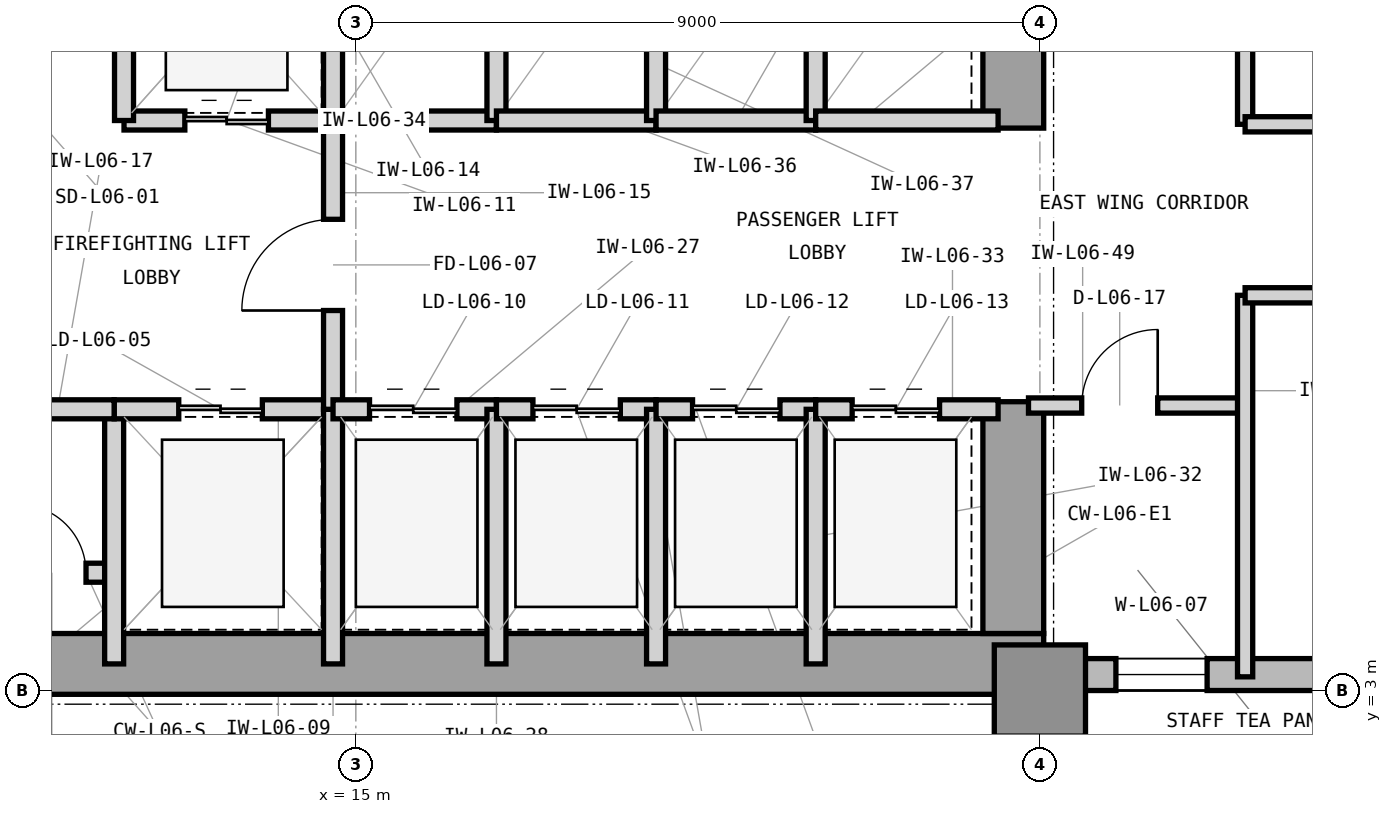
"""IFC4 building model, lengths in metres.
Left out: names, types, materials, properties, quantities, classifications, styles, units other than length and angle.
Written with IfcOpenShell. Run it as: python <this file> out.ifc"""

import sys

from ifc_helpers import new_model, si_unit, direction, frame, frame_2d, origin, origin_2d, place, context, subcontext, project, spatial, rectangle, extrude, element, fill, save


model = new_model("IFC4")
c1 = context("Model", 3, precision=1e-05, world=origin(), true_north=direction((0.0, 1.0)))
c2 = subcontext(c1, "Body", "Model", "MODEL_VIEW")
j1 = project(units=[si_unit("LENGTHUNIT", "METRE"), si_unit("PLANEANGLEUNIT", "RADIAN")], contexts=[c1])
p1 = place(None, origin())
s1 = spatial("IfcSite", under=j1, at=p1, CompositionType="ELEMENT")
p2 = place(p1, origin())
s2 = spatial("IfcBuilding", under=s1, at=p2, CompositionType="ELEMENT")
p3 = place(p2, frame((0.0, 0.0, 30.0)))
s3 = spatial("IfcBuildingStorey", under=s2, at=p3, CompositionType="ELEMENT", Elevation=30.0)
p4 = place(p3, frame((7.475, 3.35, 0.0), z_axis=(0.0, 0.0, 1.0), x_axis=(1.0, 0.0, 0.0)))
e1 = element("IfcWall", 1, at=p4, inside=s3, PredefinedType="SHEAR", context=c2, shape_type="SweptSolid", body=[
    extrude(rectangle(XDim=16.575, YDim=0.8, at=frame_2d((8.288, 0.0))), origin(), (0.0, 0.0, 1.0), 4.2),
])
p5 = place(p3, frame((23.65, 3.75, 0.0), z_axis=(0.0, 0.0, 1.0), x_axis=(0.0, 1.0, 0.0)))
e2 = element("IfcWall", 2, at=p5, inside=s3, PredefinedType="SHEAR", context=c2, shape_type="SweptSolid", body=[
    extrude(rectangle(XDim=3.05, YDim=0.8, at=frame_2d((1.525, 0.0))), origin(), (0.0, 0.0, 1.0), 4.2),
])
p6 = place(p3, frame((23.65, 10.4, 0.0), z_axis=(0.0, 0.0, 1.0), x_axis=(0.0, 1.0, 0.0)))
e3 = element("IfcWall", 3, at=p6, inside=s3, PredefinedType="SHEAR", context=c2, shape_type="SweptSolid", body=[
    extrude(rectangle(XDim=3.2, YDim=0.8, at=frame_2d((1.6, 0.0))), origin(), (0.0, 0.0, 1.0), 4.2),
])
p7 = place(p3, frame((24.0, 3.0, 0.0), z_axis=(0.0, 0.0, 1.0), x_axis=(1.0, 0.0, 0.0)))
e4 = element("IfcColumn", 4, at=p7, inside=s3, PredefinedType="COLUMN", context=c2, shape_type="SweptSolid", body=[
    extrude(rectangle(XDim=1.2, YDim=1.2, at=origin_2d()), origin(), (0.0, 0.0, 1.0), 4.2),
])
p8 = place(p3, frame((23.9, 3.21, 0.0), z_axis=(0.0, 0.0, 1.0), x_axis=(1.0, 0.0, 0.0)))
e5 = element("IfcWall", 5, at=p8, inside=s3, PredefinedType="STANDARD", context=c2, shape_type="SweptSolid", body=[
    extrude(rectangle(XDim=40.5, YDim=0.42, at=frame_2d((20.25, 0.0))), origin(), (0.0, 0.0, 1.0), 3.98),
])
p9 = place(p8, frame((1.1, 0.0, 0.85)))
e6 = element("IfcOpeningElement", 6, at=p9, cuts=e5, PredefinedType="OPENING", context=c2, shape_type="SweptSolid", body=[
    extrude(rectangle(XDim=1.2, YDim=2.45, at=frame_2d((0.6, 1.225))), frame((0.0, 0.22, 0.0), z_axis=(0.0, -1.0, 0.0), x_axis=(1.0, 0.0, 0.0)), (0.0, 0.0, 1.0), 0.44),
])
p10 = place(p8, frame((5.336, 0.0, 0.85)))
e7 = element("IfcOpeningElement", 7, at=p10, cuts=e5, PredefinedType="OPENING", context=c2, shape_type="SweptSolid", body=[
    extrude(rectangle(XDim=2.8, YDim=2.45, at=frame_2d((1.4, 1.225))), frame((0.0, 0.22, 0.0), z_axis=(0.0, -1.0, 0.0), x_axis=(1.0, 0.0, 0.0)), (0.0, 0.0, 1.0), 0.44),
])
p11 = place(p8, frame((14.336, 0.0, 0.85)))
e8 = element("IfcOpeningElement", 8, at=p11, cuts=e5, PredefinedType="OPENING", context=c2, shape_type="SweptSolid", body=[
    extrude(rectangle(XDim=2.8, YDim=2.45, at=frame_2d((1.4, 1.225))), frame((0.0, 0.22, 0.0), z_axis=(0.0, -1.0, 0.0), x_axis=(1.0, 0.0, 0.0)), (0.0, 0.0, 1.0), 0.44),
])
p12 = place(p8, frame((21.086, 0.0, 0.85)))
e9 = element("IfcOpeningElement", 9, at=p12, cuts=e5, PredefinedType="OPENING", context=c2, shape_type="SweptSolid", body=[
    extrude(rectangle(XDim=2.1, YDim=2.45, at=frame_2d((1.05, 1.225))), frame((0.0, 0.22, 0.0), z_axis=(0.0, -1.0, 0.0), x_axis=(1.0, 0.0, 0.0)), (0.0, 0.0, 1.0), 0.44),
])
p13 = place(p3, frame((10.33, 4.55, 0.0), z_axis=(0.0, 0.0, 1.0), x_axis=(1.0, 0.0, 0.0)))
e10 = element("IfcWall", 10, at=p13, inside=s3, PredefinedType="PARTITIONING", context=c2, shape_type="SweptSolid", body=[
    extrude(rectangle(XDim=1.49, YDim=0.25, at=frame_2d((0.745, 0.0))), origin(), (0.0, 0.0, 1.0), 3.97),
])
p14 = place(p13, frame((0.22, 0.0, 0.0)))
e11 = element("IfcOpeningElement", 11, at=p14, cuts=e10, PredefinedType="OPENING", context=c2, shape_type="SweptSolid", body=[
    extrude(rectangle(XDim=0.9, YDim=2.1, at=frame_2d((0.45, 1.05))), frame((0.0, 0.135, 0.0), z_axis=(0.0, -1.0, 0.0), x_axis=(1.0, 0.0, 0.0)), (0.0, 0.0, 1.0), 0.27),
])
p15 = place(p3, frame((11.82, 3.35, 0.0), z_axis=(0.0, 0.0, 1.0), x_axis=(0.0, 1.0, 0.0)))
e12 = element("IfcWall", 12, at=p15, inside=s3, PredefinedType="PARTITIONING", context=c2, shape_type="SweptSolid", body=[
    extrude(rectangle(XDim=3.35, YDim=0.25, at=frame_2d((1.675, 0.0))), origin(), (0.0, 0.0, 1.0), 3.97),
])
p16 = place(p3, frame((11.82, 6.7, 0.0), z_axis=(0.0, 0.0, 1.0), x_axis=(1.0, 0.0, 0.0)))
e13 = element("IfcWall", 13, at=p16, inside=s3, PredefinedType="PARTITIONING", context=c2, shape_type="SweptSolid", body=[
    extrude(rectangle(XDim=2.88, YDim=0.25, at=frame_2d((1.44, 0.0))), origin(), (0.0, 0.0, 1.0), 3.426),
])
p17 = place(p16, frame((0.85, 0.0, 0.0)))
e14 = element("IfcOpeningElement", 14, at=p17, cuts=e13, PredefinedType="OPENING", context=c2, shape_type="SweptSolid", body=[
    extrude(rectangle(XDim=1.1, YDim=2.25, at=frame_2d((0.55, 1.125))), frame((0.0, 0.135, 0.0), z_axis=(0.0, -1.0, 0.0), x_axis=(1.0, 0.0, 0.0)), (0.0, 0.0, 1.0), 0.27),
])
p18 = place(p3, frame((14.7, 3.35, 0.0), z_axis=(0.0, 0.0, 1.0), x_axis=(0.0, 1.0, 0.0)))
e15 = element("IfcWall", 15, at=p18, inside=s3, PredefinedType="PARTITIONING", context=c2, shape_type="SweptSolid", body=[
    extrude(rectangle(XDim=3.35, YDim=0.25, at=frame_2d((1.675, 0.0))), origin(), (0.0, 0.0, 1.0), 3.97),
])
p19 = place(p3, frame((11.95, 10.5, 0.0), z_axis=(0.0, 0.0, 1.0), x_axis=(1.0, 0.0, 0.0)))
e16 = element("IfcWall", 16, at=p19, inside=s3, PredefinedType="PARTITIONING", context=c2, shape_type="SweptSolid", body=[
    extrude(rectangle(XDim=2.75, YDim=0.25, at=frame_2d((1.375, 0.0))), origin(), (0.0, 0.0, 1.0), 3.426),
])
p20 = place(p19, frame((0.8, 0.0, 0.0)))
e17 = element("IfcOpeningElement", 17, at=p20, cuts=e16, PredefinedType="OPENING", context=c2, shape_type="SweptSolid", body=[
    extrude(rectangle(XDim=1.1, YDim=2.25, at=frame_2d((0.55, 1.125))), frame((0.0, 0.135, 0.0), z_axis=(0.0, -1.0, 0.0), x_axis=(1.0, 0.0, 0.0)), (0.0, 0.0, 1.0), 0.27),
])
for number, where, z_axis, x_axis in (
    (18, (11.95, 10.5, 0.0), (0.0, 0.0, 1.0), (0.0, 1.0, 0.0)),
    (19, (14.7, 10.5, 0.0), (0.0, 0.0, 1.0), (0.0, 1.0, 0.0)),
):
    element("IfcWall", number, at=place(p3, frame(where, z_axis=z_axis, x_axis=x_axis)), inside=s3, PredefinedType="PARTITIONING", context=c2, shape_type="SweptSolid", body=[
        extrude(rectangle(XDim=3.0, YDim=0.25, at=frame_2d((1.5, 0.0))), origin(), (0.0, 0.0, 1.0), 3.97),
    ])
p21 = place(p3, frame((14.7, 6.7, 0.0), z_axis=(0.0, 0.0, 1.0), x_axis=(0.0, 1.0, 0.0)))
e20 = element("IfcWall", 20, at=p21, inside=s3, PredefinedType="PARTITIONING", context=c2, shape_type="SweptSolid", body=[
    extrude(rectangle(XDim=3.8, YDim=0.25, at=frame_2d((1.9, 0.0))), origin(), (0.0, 0.0, 1.0), 3.97),
])
p22 = place(p21, frame((1.3, 0.0, 0.0)))
e21 = element("IfcOpeningElement", 21, at=p22, cuts=e20, PredefinedType="OPENING", context=c2, shape_type="SweptSolid", body=[
    extrude(rectangle(XDim=1.2, YDim=2.2, at=frame_2d((0.6, 1.1))), frame((0.0, 0.135, 0.0), z_axis=(0.0, -1.0, 0.0), x_axis=(1.0, 0.0, 0.0)), (0.0, 0.0, 1.0), 0.27),
])
p23 = place(p3, frame((10.33, 6.7, 0.0), z_axis=(0.0, 0.0, 1.0), x_axis=(1.0, 0.0, 0.0)))
e22 = element("IfcWall", 22, at=p23, inside=s3, PredefinedType="PARTITIONING", context=c2, shape_type="SweptSolid", body=[
    extrude(rectangle(XDim=1.49, YDim=0.25, at=frame_2d((0.745, 0.0))), origin(), (0.0, 0.0, 1.0), 3.426),
])
p24 = place(p3, frame((14.7, 6.7, 0.0), z_axis=(0.0, 0.0, 1.0), x_axis=(1.0, 0.0, 0.0)))
e23 = element("IfcWall", 23, at=p24, inside=s3, PredefinedType="PARTITIONING", context=c2, shape_type="SweptSolid", body=[
    extrude(rectangle(XDim=2.15, YDim=0.25, at=frame_2d((1.075, 0.0))), origin(), (0.0, 0.0, 1.0), 3.426),
])
p25 = place(p24, frame((0.48, 0.0, 0.0)))
e24 = element("IfcOpeningElement", 24, at=p25, cuts=e23, PredefinedType="OPENING", context=c2, shape_type="SweptSolid", body=[
    extrude(rectangle(XDim=1.15, YDim=2.25, at=frame_2d((0.575, 1.125))), frame((0.0, 0.135, 0.0), z_axis=(0.0, -1.0, 0.0), x_axis=(1.0, 0.0, 0.0)), (0.0, 0.0, 1.0), 0.27),
])
p26 = place(p3, frame((16.85, 3.35, 0.0), z_axis=(0.0, 0.0, 1.0), x_axis=(0.0, 1.0, 0.0)))
e25 = element("IfcWall", 25, at=p26, inside=s3, PredefinedType="PARTITIONING", context=c2, shape_type="SweptSolid", body=[
    extrude(rectangle(XDim=3.35, YDim=0.25, at=frame_2d((1.675, 0.0))), origin(), (0.0, 0.0, 1.0), 3.97),
])
p27 = place(p3, frame((16.85, 6.7, 0.0), z_axis=(0.0, 0.0, 1.0), x_axis=(1.0, 0.0, 0.0)))
e26 = element("IfcWall", 26, at=p27, inside=s3, PredefinedType="PARTITIONING", context=c2, shape_type="SweptSolid", body=[
    extrude(rectangle(XDim=2.1, YDim=0.25, at=frame_2d((1.05, 0.0))), origin(), (0.0, 0.0, 1.0), 3.426),
])
p28 = place(p27, frame((0.48, 0.0, 0.0)))
e27 = element("IfcOpeningElement", 27, at=p28, cuts=e26, PredefinedType="OPENING", context=c2, shape_type="SweptSolid", body=[
    extrude(rectangle(XDim=1.15, YDim=2.25, at=frame_2d((0.575, 1.125))), frame((0.0, 0.135, 0.0), z_axis=(0.0, -1.0, 0.0), x_axis=(1.0, 0.0, 0.0)), (0.0, 0.0, 1.0), 0.27),
])
p29 = place(p3, frame((18.95, 3.35, 0.0), z_axis=(0.0, 0.0, 1.0), x_axis=(0.0, 1.0, 0.0)))
e28 = element("IfcWall", 28, at=p29, inside=s3, PredefinedType="PARTITIONING", context=c2, shape_type="SweptSolid", body=[
    extrude(rectangle(XDim=3.35, YDim=0.25, at=frame_2d((1.675, 0.0))), origin(), (0.0, 0.0, 1.0), 3.97),
])
p30 = place(p3, frame((18.95, 6.7, 0.0), z_axis=(0.0, 0.0, 1.0), x_axis=(1.0, 0.0, 0.0)))
e29 = element("IfcWall", 29, at=p30, inside=s3, PredefinedType="PARTITIONING", context=c2, shape_type="SweptSolid", body=[
    extrude(rectangle(XDim=2.1, YDim=0.25, at=frame_2d((1.05, 0.0))), origin(), (0.0, 0.0, 1.0), 3.426),
])
p31 = place(p30, frame((0.48, 0.0, 0.0)))
e30 = element("IfcOpeningElement", 30, at=p31, cuts=e29, PredefinedType="OPENING", context=c2, shape_type="SweptSolid", body=[
    extrude(rectangle(XDim=1.15, YDim=2.25, at=frame_2d((0.575, 1.125))), frame((0.0, 0.135, 0.0), z_axis=(0.0, -1.0, 0.0), x_axis=(1.0, 0.0, 0.0)), (0.0, 0.0, 1.0), 0.27),
])
p32 = place(p3, frame((21.05, 3.35, 0.0), z_axis=(0.0, 0.0, 1.0), x_axis=(0.0, 1.0, 0.0)))
e31 = element("IfcWall", 31, at=p32, inside=s3, PredefinedType="PARTITIONING", context=c2, shape_type="SweptSolid", body=[
    extrude(rectangle(XDim=3.35, YDim=0.25, at=frame_2d((1.675, 0.0))), origin(), (0.0, 0.0, 1.0), 3.97),
])
p33 = place(p3, frame((21.05, 6.7, 0.0), z_axis=(0.0, 0.0, 1.0), x_axis=(1.0, 0.0, 0.0)))
e32 = element("IfcWall", 32, at=p33, inside=s3, PredefinedType="PARTITIONING", context=c2, shape_type="SweptSolid", body=[
    extrude(rectangle(XDim=2.4, YDim=0.25, at=frame_2d((1.2, 0.0))), origin(), (0.0, 0.0, 1.0), 3.426),
])
p34 = place(p33, frame((0.48, 0.0, 0.0)))
e33 = element("IfcOpeningElement", 33, at=p34, cuts=e32, PredefinedType="OPENING", context=c2, shape_type="SweptSolid", body=[
    extrude(rectangle(XDim=1.15, YDim=2.25, at=frame_2d((0.575, 1.125))), frame((0.0, 0.135, 0.0), z_axis=(0.0, -1.0, 0.0), x_axis=(1.0, 0.0, 0.0)), (0.0, 0.0, 1.0), 0.27),
])
p35 = place(p3, frame((14.7, 10.5, 0.0), z_axis=(0.0, 0.0, 1.0), x_axis=(1.0, 0.0, 0.0)))
e34 = element("IfcWall", 34, at=p35, inside=s3, PredefinedType="PARTITIONING", context=c2, shape_type="SweptSolid", body=[
    extrude(rectangle(XDim=2.15, YDim=0.25, at=frame_2d((1.075, 0.0))), origin(), (0.0, 0.0, 1.0), 3.426),
])
p36 = place(p3, frame((16.85, 10.5, 0.0), z_axis=(0.0, 0.0, 1.0), x_axis=(0.0, 1.0, 0.0)))
e35 = element("IfcWall", 35, at=p36, inside=s3, PredefinedType="PARTITIONING", context=c2, shape_type="SweptSolid", body=[
    extrude(rectangle(XDim=3.0, YDim=0.25, at=frame_2d((1.5, 0.0))), origin(), (0.0, 0.0, 1.0), 3.97),
])
p37 = place(p3, frame((16.85, 10.5, 0.0), z_axis=(0.0, 0.0, 1.0), x_axis=(1.0, 0.0, 0.0)))
e36 = element("IfcWall", 36, at=p37, inside=s3, PredefinedType="PARTITIONING", context=c2, shape_type="SweptSolid", body=[
    extrude(rectangle(XDim=2.1, YDim=0.25, at=frame_2d((1.05, 0.0))), origin(), (0.0, 0.0, 1.0), 3.426),
])
p38 = place(p3, frame((18.95, 10.5, 0.0), z_axis=(0.0, 0.0, 1.0), x_axis=(0.0, 1.0, 0.0)))
e37 = element("IfcWall", 37, at=p38, inside=s3, PredefinedType="PARTITIONING", context=c2, shape_type="SweptSolid", body=[
    extrude(rectangle(XDim=3.0, YDim=0.25, at=frame_2d((1.5, 0.0))), origin(), (0.0, 0.0, 1.0), 3.97),
])
p39 = place(p3, frame((18.95, 10.5, 0.0), z_axis=(0.0, 0.0, 1.0), x_axis=(1.0, 0.0, 0.0)))
e38 = element("IfcWall", 38, at=p39, inside=s3, PredefinedType="PARTITIONING", context=c2, shape_type="SweptSolid", body=[
    extrude(rectangle(XDim=2.1, YDim=0.25, at=frame_2d((1.05, 0.0))), origin(), (0.0, 0.0, 1.0), 3.426),
])
p40 = place(p3, frame((21.05, 10.5, 0.0), z_axis=(0.0, 0.0, 1.0), x_axis=(0.0, 1.0, 0.0)))
e39 = element("IfcWall", 39, at=p40, inside=s3, PredefinedType="PARTITIONING", context=c2, shape_type="SweptSolid", body=[
    extrude(rectangle(XDim=3.0, YDim=0.25, at=frame_2d((1.5, 0.0))), origin(), (0.0, 0.0, 1.0), 3.97),
])
p41 = place(p3, frame((21.05, 10.5, 0.0), z_axis=(0.0, 0.0, 1.0), x_axis=(1.0, 0.0, 0.0)))
e40 = element("IfcWall", 40, at=p41, inside=s3, PredefinedType="PARTITIONING", context=c2, shape_type="SweptSolid", body=[
    extrude(rectangle(XDim=2.4, YDim=0.25, at=frame_2d((1.2, 0.0))), origin(), (0.0, 0.0, 1.0), 3.426),
])
p42 = place(p3, frame((23.85, 6.75, 0.0), z_axis=(0.0, 0.0, 1.0), x_axis=(1.0, 0.0, 0.0)))
e41 = element("IfcWall", 41, at=p42, inside=s3, PredefinedType="PARTITIONING", context=c2, shape_type="SweptSolid", body=[
    extrude(rectangle(XDim=2.85, YDim=0.2, at=frame_2d((1.425, 0.0))), origin(), (0.0, 0.0, 1.0), 3.97),
])
p43 = place(p42, frame((0.7, 0.0, 0.0)))
e42 = element("IfcOpeningElement", 42, at=p43, cuts=e41, PredefinedType="OPENING", context=c2, shape_type="SweptSolid", body=[
    extrude(rectangle(XDim=1.0, YDim=2.15, at=frame_2d((0.5, 1.075))), frame((0.0, 0.11, 0.0), z_axis=(0.0, -1.0, 0.0), x_axis=(1.0, 0.0, 0.0)), (0.0, 0.0, 1.0), 0.22),
])
p44 = place(p3, frame((26.7, 3.18, 0.0), z_axis=(0.0, 0.0, 1.0), x_axis=(0.0, 1.0, 0.0)))
e43 = element("IfcWall", 43, at=p44, inside=s3, PredefinedType="PARTITIONING", context=c2, shape_type="SweptSolid", body=[
    extrude(rectangle(XDim=5.02, YDim=0.2, at=frame_2d((2.51, 0.0))), origin(), (0.0, 0.0, 1.0), 3.97),
])
p45 = place(p3, frame((26.7, 10.45, 0.0), z_axis=(0.0, 0.0, 1.0), x_axis=(0.0, 1.0, 0.0)))
e44 = element("IfcWall", 44, at=p45, inside=s3, PredefinedType="PARTITIONING", context=c2, shape_type="SweptSolid", body=[
    extrude(rectangle(XDim=10.37, YDim=0.2, at=frame_2d((5.185, 0.0))), origin(), (0.0, 0.0, 1.0), 3.97),
])
p46 = place(p3, frame((26.7, 8.2, 0.0), z_axis=(0.0, 0.0, 1.0), x_axis=(1.0, 0.0, 0.0)))
e45 = element("IfcWall", 45, at=p46, inside=s3, PredefinedType="PARTITIONING", context=c2, shape_type="SweptSolid", body=[
    extrude(rectangle(XDim=9.0, YDim=0.2, at=frame_2d((4.5, 0.0))), origin(), (0.0, 0.0, 1.0), 3.97),
])
p47 = place(p46, frame((3.5, 0.0, 0.0)))
e46 = element("IfcOpeningElement", 46, at=p47, cuts=e45, PredefinedType="OPENING", context=c2, shape_type="SweptSolid", body=[
    extrude(rectangle(XDim=2.0, YDim=2.5, at=frame_2d((1.0, 1.25))), frame((0.0, 0.11, 0.0), z_axis=(0.0, -1.0, 0.0), x_axis=(1.0, 0.0, 0.0)), (0.0, 0.0, 1.0), 0.22),
])
p48 = place(p3, frame((26.7, 10.45, 0.0), z_axis=(0.0, 0.0, 1.0), x_axis=(1.0, 0.0, 0.0)))
e47 = element("IfcWall", 47, at=p48, inside=s3, PredefinedType="PARTITIONING", context=c2, shape_type="SweptSolid", body=[
    extrude(rectangle(XDim=7.5, YDim=0.2, at=frame_2d((3.75, 0.0))), origin(), (0.0, 0.0, 1.0), 3.97),
])
p49 = place(p48, frame((3.25, 0.0, 0.0)))
e48 = element("IfcOpeningElement", 48, at=p49, cuts=e47, PredefinedType="OPENING", context=c2, shape_type="SweptSolid", body=[
    extrude(rectangle(XDim=1.0, YDim=2.15, at=frame_2d((0.5, 1.075))), frame((0.0, 0.11, 0.0), z_axis=(0.0, -1.0, 0.0), x_axis=(1.0, 0.0, 0.0)), (0.0, 0.0, 1.0), 0.22),
])
p50 = place(p14, origin())
e49 = element("IfcDoor", 49, at=p50, inside=s3, OperationType="SINGLE_SWING_LEFT", PredefinedType="TRAPDOOR", context=c2, shape_type="SweptSolid", body=[
    extrude(rectangle(XDim=0.9, YDim=2.1, at=frame_2d((0.45, 1.05))), frame((0.0, 0.025, 0.0), z_axis=(0.0, -1.0, 0.0), x_axis=(1.0, 0.0, 0.0)), (0.0, 0.0, 1.0), 0.05),
])
fill(e11, e49)
p51 = place(p17, origin())
e50 = element("IfcDoor", 50, at=p51, inside=s3, OperationType="DOUBLE_DOOR_SLIDING", PredefinedType="DOOR", context=c2, shape_type="SweptSolid", body=[
    extrude(rectangle(XDim=1.1, YDim=2.25, at=frame_2d((0.55, 1.125))), frame((0.0, 0.025, 0.0), z_axis=(0.0, -1.0, 0.0), x_axis=(1.0, 0.0, 0.0)), (0.0, 0.0, 1.0), 0.05),
])
fill(e14, e50)
p52 = place(p20, origin())
e51 = element("IfcDoor", 51, at=p52, inside=s3, OperationType="DOUBLE_DOOR_SLIDING", PredefinedType="DOOR", context=c2, shape_type="SweptSolid", body=[
    extrude(rectangle(XDim=1.1, YDim=2.25, at=frame_2d((0.55, 1.125))), frame((0.0, 0.025, 0.0), z_axis=(0.0, -1.0, 0.0), x_axis=(1.0, 0.0, 0.0)), (0.0, 0.0, 1.0), 0.05),
])
fill(e17, e51)
p53 = place(p22, origin())
e52 = element("IfcDoor", 52, at=p53, inside=s3, OperationType="SINGLE_SWING_LEFT", PredefinedType="DOOR", context=c2, shape_type="SweptSolid", body=[
    extrude(rectangle(XDim=1.2, YDim=2.2, at=frame_2d((0.6, 1.1))), frame((0.0, 0.025, 0.0), z_axis=(0.0, -1.0, 0.0), x_axis=(1.0, 0.0, 0.0)), (0.0, 0.0, 1.0), 0.05),
])
fill(e21, e52)
p54 = place(p25, origin())
e53 = element("IfcDoor", 53, at=p54, inside=s3, OperationType="DOUBLE_DOOR_SLIDING", PredefinedType="DOOR", context=c2, shape_type="SweptSolid", body=[
    extrude(rectangle(XDim=1.15, YDim=2.25, at=frame_2d((0.575, 1.125))), frame((0.0, 0.025, 0.0), z_axis=(0.0, -1.0, 0.0), x_axis=(1.0, 0.0, 0.0)), (0.0, 0.0, 1.0), 0.05),
])
fill(e24, e53)
p55 = place(p28, origin())
e54 = element("IfcDoor", 54, at=p55, inside=s3, OperationType="DOUBLE_DOOR_SLIDING", PredefinedType="DOOR", context=c2, shape_type="SweptSolid", body=[
    extrude(rectangle(XDim=1.15, YDim=2.25, at=frame_2d((0.575, 1.125))), frame((0.0, 0.025, 0.0), z_axis=(0.0, -1.0, 0.0), x_axis=(1.0, 0.0, 0.0)), (0.0, 0.0, 1.0), 0.05),
])
fill(e27, e54)
p56 = place(p31, origin())
e55 = element("IfcDoor", 55, at=p56, inside=s3, OperationType="DOUBLE_DOOR_SLIDING", PredefinedType="DOOR", context=c2, shape_type="SweptSolid", body=[
    extrude(rectangle(XDim=1.15, YDim=2.25, at=frame_2d((0.575, 1.125))), frame((0.0, 0.025, 0.0), z_axis=(0.0, -1.0, 0.0), x_axis=(1.0, 0.0, 0.0)), (0.0, 0.0, 1.0), 0.05),
])
fill(e30, e55)
p57 = place(p34, origin())
e56 = element("IfcDoor", 56, at=p57, inside=s3, OperationType="DOUBLE_DOOR_SLIDING", PredefinedType="DOOR", context=c2, shape_type="SweptSolid", body=[
    extrude(rectangle(XDim=1.15, YDim=2.25, at=frame_2d((0.575, 1.125))), frame((0.0, 0.025, 0.0), z_axis=(0.0, -1.0, 0.0), x_axis=(1.0, 0.0, 0.0)), (0.0, 0.0, 1.0), 0.05),
])
fill(e33, e56)
p58 = place(p43, origin())
e57 = element("IfcDoor", 57, at=p58, inside=s3, OperationType="SINGLE_SWING_RIGHT", PredefinedType="DOOR", context=c2, shape_type="SweptSolid", body=[
    extrude(rectangle(XDim=1.0, YDim=2.15, at=frame_2d((0.5, 1.075))), frame((0.0, 0.025, 0.0), z_axis=(0.0, -1.0, 0.0), x_axis=(1.0, 0.0, 0.0)), (0.0, 0.0, 1.0), 0.05),
])
fill(e42, e57)
p59 = place(p9, origin())
e58 = element("IfcWindow", 58, at=p59, inside=s3, PartitioningType="SINGLE_PANEL", PredefinedType="WINDOW", context=c2, shape_type="SweptSolid", body=[
    extrude(rectangle(XDim=1.2, YDim=2.45, at=frame_2d((0.6, 1.225))), frame((0.0, 0.11, 0.0), z_axis=(0.0, -1.0, 0.0), x_axis=(1.0, 0.0, 0.0)), (0.0, 0.0, 1.0), 0.06),
])
fill(e6, e58)
save(model, sys.argv[1])
